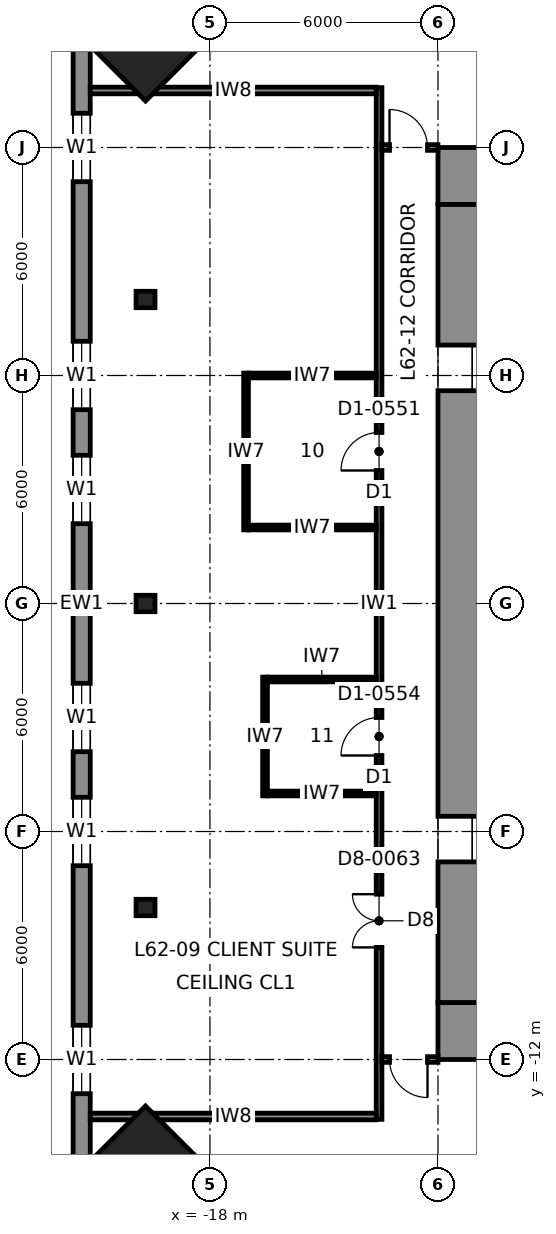
"""IFC4 building model, lengths in metres.
Left out: names, types, materials, properties, quantities, classifications, styles, units other than length and angle.
Written with IfcOpenShell. Run it as: python <this file> out.ifc"""

import sys

from ifc_helpers import new_model, si_unit, direction, frame, frame_2d, origin, origin_2d, place, context, subcontext, project, spatial, rectangle, i_section, extrude, element, fill, save


model = new_model("IFC4")
c1 = context("Model", 3, precision=1e-05, world=origin(), true_north=direction((0.0, 1.0)))
c2 = subcontext(c1, "Body", "Model", "MODEL_VIEW")
j1 = project(units=[si_unit("LENGTHUNIT", "METRE"), si_unit("PLANEANGLEUNIT", "RADIAN")], contexts=[c1])
p1 = place(None, origin())
s1 = spatial("IfcSite", under=j1, at=p1, CompositionType="ELEMENT")
p2 = place(p1, origin())
s2 = spatial("IfcBuilding", under=s1, at=p2, CompositionType="ELEMENT")
p3 = place(p2, frame((0.0, 0.0, 277.8)))
s3 = spatial("IfcBuildingStorey", under=s2, at=p3, CompositionType="ELEMENT", Elevation=277.8)
for number, where, z_axis, x_axis in (
    (1, (-19.695, -15.345, 0.0), (0.04, 0.04, 0.998), (-0.708, 0.707, 0.0)),
    (2, (-19.695, 15.345, 0.0), (0.04, -0.04, 0.998), (0.708, 0.707, 0.0)),
):
    element("IfcColumn", number, at=place(p3, frame(where, z_axis=z_axis, x_axis=x_axis)), inside=s3, PredefinedType="COLUMN", context=c2, shape_type="SweptSolid", body=[
        extrude(rectangle(XDim=3.0, YDim=3.0, at=origin_2d()), origin(), (0.0, 0.0, 1.0), 4.007),
    ])
for number, where, z_axis, x_axis in (
    (3, (-19.695, 0.0, 0.0), (0.04, 0.0, 0.999), (0.0, 1.0, 0.0)),
    (4, (-19.695, 8.0, 0.0), (0.04, 0.0, 0.999), (0.0, 1.0, 0.0)),
    (5, (-19.695, -8.0, 0.0), (0.04, 0.0, 0.999), (0.0, 1.0, 0.0)),
):
    element("IfcColumn", number, at=place(p3, frame(where, z_axis=z_axis, x_axis=x_axis)), inside=s3, PredefinedType="COLUMN", context=c2, shape_type="SweptSolid", body=[
        extrude(i_section(OverallWidth=0.432, OverallDepth=0.498, WebThickness=0.056, FlangeThickness=0.089, at=origin_2d()), origin(), (0.0, 0.0, 1.0), 4.003),
    ])
for number, where, z_axis, x_axis in (
    (6, (-12.0, 11.25, 0.0), (0.0, 0.0, 1.0), (1.0, 0.0, 0.0)),
    (7, (12.0, -11.25, 0.0), (0.0, 0.0, 1.0), (-1.0, 0.0, 0.0)),
):
    element("IfcWall", number, at=place(p3, frame(where, z_axis=z_axis, x_axis=x_axis)), inside=s3, PredefinedType="SHEAR", context=c2, shape_type="SweptSolid", body=[
        extrude(rectangle(XDim=24.0, YDim=1.5, at=frame_2d((12.0, 0.0))), origin(), (0.0, 0.0, 1.0), 4.0),
    ])
p4 = place(p3, frame((-11.25, -10.5, 0.0), z_axis=(0.0, 0.0, 1.0), x_axis=(0.0, 1.0, 0.0)))
e8 = element("IfcWall", 8, at=p4, inside=s3, PredefinedType="SHEAR", context=c2, shape_type="SweptSolid", body=[
    extrude(rectangle(XDim=21.0, YDim=1.5, at=frame_2d((10.5, 0.0))), origin(), (0.0, 0.0, 1.0), 4.0),
])
p5 = place(p4, frame((16.1, 0.0, 0.0)))
e9 = element("IfcOpeningElement", 9, at=p5, cuts=e8, PredefinedType="OPENING", context=c2, shape_type="SweptSolid", body=[
    extrude(rectangle(XDim=1.2, YDim=2.3, at=frame_2d((0.6, 1.15))), frame((0.0, 0.76, 0.0), z_axis=(0.0, -1.0, 0.0), x_axis=(1.0, 0.0, 0.0)), (0.0, 0.0, 1.0), 1.52),
])
p6 = place(p4, frame((3.7, 0.0, 0.0)))
e10 = element("IfcOpeningElement", 10, at=p6, cuts=e8, PredefinedType="OPENING", context=c2, shape_type="SweptSolid", body=[
    extrude(rectangle(XDim=1.2, YDim=2.3, at=frame_2d((0.6, 1.15))), frame((0.0, 0.76, 0.0), z_axis=(0.0, -1.0, 0.0), x_axis=(1.0, 0.0, 0.0)), (0.0, 0.0, 1.0), 1.52),
])
p7 = place(p3, frame((-21.375, 17.1, 0.0), z_axis=(0.0, 0.0, 1.0), x_axis=(0.0, -1.0, 0.0)))
e11 = element("IfcWall", 11, at=p7, inside=s3, PredefinedType="SOLIDWALL", context=c2, shape_type="SweptSolid", body=[
    extrude(rectangle(XDim=34.2, YDim=0.45, at=frame_2d((17.1, 0.0))), origin(), (0.0, 0.0, 1.0), 3.83),
])
p8 = place(p7, frame((4.2, 0.0, 0.7)))
e12 = element("IfcOpeningElement", 12, at=p8, cuts=e11, PredefinedType="OPENING", context=c2, shape_type="SweptSolid", body=[
    extrude(rectangle(XDim=1.8, YDim=2.6, at=frame_2d((0.9, 1.3))), frame((0.0, 0.235, 0.0), z_axis=(0.0, -1.0, 0.0), x_axis=(1.0, 0.0, 0.0)), (0.0, 0.0, 1.0), 0.47),
])
p9 = place(p7, frame((10.2, 0.0, 0.7)))
e13 = element("IfcOpeningElement", 13, at=p9, cuts=e11, PredefinedType="OPENING", context=c2, shape_type="SweptSolid", body=[
    extrude(rectangle(XDim=1.8, YDim=2.6, at=frame_2d((0.9, 1.3))), frame((0.0, 0.235, 0.0), z_axis=(0.0, -1.0, 0.0), x_axis=(1.0, 0.0, 0.0)), (0.0, 0.0, 1.0), 0.47),
])
p10 = place(p7, frame((13.2, 0.0, 0.7)))
e14 = element("IfcOpeningElement", 14, at=p10, cuts=e11, PredefinedType="OPENING", context=c2, shape_type="SweptSolid", body=[
    extrude(rectangle(XDim=1.8, YDim=2.6, at=frame_2d((0.9, 1.3))), frame((0.0, 0.235, 0.0), z_axis=(0.0, -1.0, 0.0), x_axis=(1.0, 0.0, 0.0)), (0.0, 0.0, 1.0), 0.47),
])
p11 = place(p7, frame((19.2, 0.0, 0.7)))
e15 = element("IfcOpeningElement", 15, at=p11, cuts=e11, PredefinedType="OPENING", context=c2, shape_type="SweptSolid", body=[
    extrude(rectangle(XDim=1.8, YDim=2.6, at=frame_2d((0.9, 1.3))), frame((0.0, 0.235, 0.0), z_axis=(0.0, -1.0, 0.0), x_axis=(1.0, 0.0, 0.0)), (0.0, 0.0, 1.0), 0.47),
])
p12 = place(p7, frame((22.2, 0.0, 0.7)))
e16 = element("IfcOpeningElement", 16, at=p12, cuts=e11, PredefinedType="OPENING", context=c2, shape_type="SweptSolid", body=[
    extrude(rectangle(XDim=1.8, YDim=2.6, at=frame_2d((0.9, 1.3))), frame((0.0, 0.235, 0.0), z_axis=(0.0, -1.0, 0.0), x_axis=(1.0, 0.0, 0.0)), (0.0, 0.0, 1.0), 0.47),
])
p13 = place(p7, frame((28.2, 0.0, 0.7)))
e17 = element("IfcOpeningElement", 17, at=p13, cuts=e11, PredefinedType="OPENING", context=c2, shape_type="SweptSolid", body=[
    extrude(rectangle(XDim=1.8, YDim=2.6, at=frame_2d((0.9, 1.3))), frame((0.0, 0.235, 0.0), z_axis=(0.0, -1.0, 0.0), x_axis=(1.0, 0.0, 0.0)), (0.0, 0.0, 1.0), 0.47),
])
p14 = place(p3, frame((-13.55, 13.575, 0.0), z_axis=(0.0, 0.0, 1.0), x_axis=(0.0, -1.0, 0.0)))
e18 = element("IfcWall", 18, at=p14, inside=s3, PredefinedType="PARTITIONING", context=c2, shape_type="SweptSolid", body=[
    extrude(rectangle(XDim=27.15, YDim=0.15, at=frame_2d((13.575, 0.0))), origin(), (0.0, 0.0, 1.0), 3.83),
])
p15 = place(p14, frame((21.225, 0.0, 0.0)))
e19 = element("IfcOpeningElement", 19, at=p15, cuts=e18, PredefinedType="OPENING", context=c2, shape_type="SweptSolid", body=[
    extrude(rectangle(XDim=1.4, YDim=2.3, at=frame_2d((0.7, 1.15))), frame((0.0, 0.085, 0.0), z_axis=(0.0, -1.0, 0.0), x_axis=(1.0, 0.0, 0.0)), (0.0, 0.0, 1.0), 0.17),
])
p16 = place(p14, frame((9.075, 0.0, 0.0)))
e20 = element("IfcOpeningElement", 20, at=p16, cuts=e18, PredefinedType="OPENING", context=c2, shape_type="SweptSolid", body=[
    extrude(rectangle(XDim=1.0, YDim=2.3, at=frame_2d((0.5, 1.15))), frame((0.0, 0.085, 0.0), z_axis=(0.0, -1.0, 0.0), x_axis=(1.0, 0.0, 0.0)), (0.0, 0.0, 1.0), 0.17),
])
p17 = place(p14, frame((16.575, 0.0, 0.0)))
e21 = element("IfcOpeningElement", 21, at=p17, cuts=e18, PredefinedType="OPENING", context=c2, shape_type="SweptSolid", body=[
    extrude(rectangle(XDim=1.0, YDim=2.3, at=frame_2d((0.5, 1.15))), frame((0.0, 0.085, 0.0), z_axis=(0.0, -1.0, 0.0), x_axis=(1.0, 0.0, 0.0)), (0.0, 0.0, 1.0), 0.17),
])
p18 = place(p3, frame((-13.475, 12.0, 0.0), z_axis=(0.0, 0.0, 1.0), x_axis=(1.0, 0.0, 0.0)))
e22 = element("IfcWall", 22, at=p18, inside=s3, PredefinedType="PARTITIONING", context=c2, shape_type="SweptSolid", body=[
    extrude(rectangle(XDim=1.475, YDim=0.15, at=frame_2d((0.738, 0.0))), origin(), (0.0, 0.0, 1.0), 3.83),
])
p19 = place(p18, frame((0.2, 0.0, 0.0)))
e23 = element("IfcOpeningElement", 23, at=p19, cuts=e22, PredefinedType="OPENING", context=c2, shape_type="SweptSolid", body=[
    extrude(rectangle(XDim=1.0, YDim=2.3, at=frame_2d((0.5, 1.15))), frame((0.0, 0.085, 0.0), z_axis=(0.0, -1.0, 0.0), x_axis=(1.0, 0.0, 0.0)), (0.0, 0.0, 1.0), 0.17),
])
p20 = place(p3, frame((-12.0, -12.0, 0.0), z_axis=(0.0, 0.0, 1.0), x_axis=(-1.0, 0.0, 0.0)))
e24 = element("IfcWall", 24, at=p20, inside=s3, PredefinedType="PARTITIONING", context=c2, shape_type="SweptSolid", body=[
    extrude(rectangle(XDim=1.475, YDim=0.15, at=frame_2d((0.738, 0.0))), origin(), (0.0, 0.0, 1.0), 3.83),
])
p21 = place(p20, frame((0.275, 0.0, 0.0)))
e25 = element("IfcOpeningElement", 25, at=p21, cuts=e24, PredefinedType="OPENING", context=c2, shape_type="SweptSolid", body=[
    extrude(rectangle(XDim=1.0, YDim=2.3, at=frame_2d((0.5, 1.15))), frame((0.0, 0.085, 0.0), z_axis=(0.0, -1.0, 0.0), x_axis=(1.0, 0.0, 0.0)), (0.0, 0.0, 1.0), 0.17),
])
for number, where, z_axis, x_axis in (
    (26, (-21.15, 13.5, 0.0), (0.0, 0.0, 1.0), (1.0, 0.0, 0.0)),
    (27, (-13.625, -13.5, 0.0), (0.0, 0.0, 1.0), (-1.0, 0.0, 0.0)),
):
    element("IfcWall", number, at=place(p3, frame(where, z_axis=z_axis, x_axis=x_axis)), inside=s3, PredefinedType="PARTITIONING", context=c2, shape_type="SweptSolid", body=[
        extrude(rectangle(XDim=7.525, YDim=0.175, at=frame_2d((3.762, 0.0))), origin(), (0.0, 0.0, 1.0), 3.83),
    ])
p22 = place(p3, frame((-17.05, 1.938, 0.0), z_axis=(0.0, 0.0, 1.0), x_axis=(0.0, 1.0, 0.0)))
e28 = element("IfcWall", 28, at=p22, inside=s3, PredefinedType="PARTITIONING", context=c2, shape_type="SweptSolid", body=[
    extrude(rectangle(XDim=4.125, YDim=0.125, at=frame_2d((2.062, 0.0))), origin(), (0.0, 0.0, 1.0), 3.83),
])
for number, where, z_axis, x_axis in (
    (29, (-13.625, 2.0, 0.0), (0.0, 0.0, 1.0), (-1.0, 0.0, 0.0)),
    (30, (-13.625, 6.0, 0.0), (0.0, 0.0, 1.0), (-1.0, 0.0, 0.0)),
):
    element("IfcWall", number, at=place(p3, frame(where, z_axis=z_axis, x_axis=x_axis)), inside=s3, PredefinedType="PARTITIONING", context=c2, shape_type="SweptSolid", body=[
        extrude(rectangle(XDim=3.363, YDim=0.125, at=frame_2d((1.681, 0.0))), origin(), (0.0, 0.0, 1.0), 3.83),
    ])
p23 = place(p3, frame((-16.55, -5.062, 0.0), z_axis=(0.0, 0.0, 1.0), x_axis=(0.0, 1.0, 0.0)))
e31 = element("IfcWall", 31, at=p23, inside=s3, PredefinedType="PARTITIONING", context=c2, shape_type="SweptSolid", body=[
    extrude(rectangle(XDim=3.125, YDim=0.125, at=frame_2d((1.562, 0.0))), origin(), (0.0, 0.0, 1.0), 3.83),
])
for number, where, z_axis, x_axis in (
    (32, (-13.625, -5.0, 0.0), (0.0, 0.0, 1.0), (-1.0, 0.0, 0.0)),
    (33, (-13.625, -2.0, 0.0), (0.0, 0.0, 1.0), (-1.0, 0.0, 0.0)),
):
    element("IfcWall", number, at=place(p3, frame(where, z_axis=z_axis, x_axis=x_axis)), inside=s3, PredefinedType="PARTITIONING", context=c2, shape_type="SweptSolid", body=[
        extrude(rectangle(XDim=2.863, YDim=0.125, at=frame_2d((1.431, 0.0))), origin(), (0.0, 0.0, 1.0), 3.83),
    ])
p24 = place(p8, origin())
e34 = element("IfcWindow", 34, at=p24, inside=s3, PartitioningType="SINGLE_PANEL", PredefinedType="WINDOW", context=c2, shape_type="SweptSolid", body=[
    extrude(rectangle(XDim=1.8, YDim=2.6, at=frame_2d((0.9, 1.3))), frame((0.0, 0.03, 0.0), z_axis=(0.0, -1.0, 0.0), x_axis=(1.0, 0.0, 0.0)), (0.0, 0.0, 1.0), 0.06),
])
fill(e12, e34)
p25 = place(p9, origin())
e35 = element("IfcWindow", 35, at=p25, inside=s3, PartitioningType="SINGLE_PANEL", PredefinedType="WINDOW", context=c2, shape_type="SweptSolid", body=[
    extrude(rectangle(XDim=1.8, YDim=2.6, at=frame_2d((0.9, 1.3))), frame((0.0, 0.03, 0.0), z_axis=(0.0, -1.0, 0.0), x_axis=(1.0, 0.0, 0.0)), (0.0, 0.0, 1.0), 0.06),
])
fill(e13, e35)
p26 = place(p10, origin())
e36 = element("IfcWindow", 36, at=p26, inside=s3, PartitioningType="SINGLE_PANEL", PredefinedType="WINDOW", context=c2, shape_type="SweptSolid", body=[
    extrude(rectangle(XDim=1.8, YDim=2.6, at=frame_2d((0.9, 1.3))), frame((0.0, 0.03, 0.0), z_axis=(0.0, -1.0, 0.0), x_axis=(1.0, 0.0, 0.0)), (0.0, 0.0, 1.0), 0.06),
])
fill(e14, e36)
p27 = place(p11, origin())
e37 = element("IfcWindow", 37, at=p27, inside=s3, PartitioningType="SINGLE_PANEL", PredefinedType="WINDOW", context=c2, shape_type="SweptSolid", body=[
    extrude(rectangle(XDim=1.8, YDim=2.6, at=frame_2d((0.9, 1.3))), frame((0.0, 0.03, 0.0), z_axis=(0.0, -1.0, 0.0), x_axis=(1.0, 0.0, 0.0)), (0.0, 0.0, 1.0), 0.06),
])
fill(e15, e37)
p28 = place(p12, origin())
e38 = element("IfcWindow", 38, at=p28, inside=s3, PartitioningType="SINGLE_PANEL", PredefinedType="WINDOW", context=c2, shape_type="SweptSolid", body=[
    extrude(rectangle(XDim=1.8, YDim=2.6, at=frame_2d((0.9, 1.3))), frame((0.0, 0.03, 0.0), z_axis=(0.0, -1.0, 0.0), x_axis=(1.0, 0.0, 0.0)), (0.0, 0.0, 1.0), 0.06),
])
fill(e16, e38)
p29 = place(p13, origin())
e39 = element("IfcWindow", 39, at=p29, inside=s3, PartitioningType="SINGLE_PANEL", PredefinedType="WINDOW", context=c2, shape_type="SweptSolid", body=[
    extrude(rectangle(XDim=1.8, YDim=2.6, at=frame_2d((0.9, 1.3))), frame((0.0, 0.03, 0.0), z_axis=(0.0, -1.0, 0.0), x_axis=(1.0, 0.0, 0.0)), (0.0, 0.0, 1.0), 0.06),
])
fill(e17, e39)
p30 = place(p19, origin())
e40 = element("IfcDoor", 40, at=p30, inside=s3, OperationType="SINGLE_SWING_LEFT", PredefinedType="DOOR", context=c2, shape_type="SweptSolid", body=[
    extrude(rectangle(XDim=1.0, YDim=2.3, at=frame_2d((0.5, 1.15))), frame((0.0, 0.025, 0.0), z_axis=(0.0, -1.0, 0.0), x_axis=(1.0, 0.0, 0.0)), (0.0, 0.0, 1.0), 0.05),
])
fill(e23, e40)
p31 = place(p21, origin())
e41 = element("IfcDoor", 41, at=p31, inside=s3, OperationType="SINGLE_SWING_LEFT", PredefinedType="DOOR", context=c2, shape_type="SweptSolid", body=[
    extrude(rectangle(XDim=1.0, YDim=2.3, at=frame_2d((0.5, 1.15))), frame((0.0, 0.025, 0.0), z_axis=(0.0, -1.0, 0.0), x_axis=(1.0, 0.0, 0.0)), (0.0, 0.0, 1.0), 0.05),
])
fill(e25, e41)
p32 = place(p15, frame((1.4, 0.0, 0.0), z_axis=(0.0, 0.0, 1.0), x_axis=(-1.0, 0.0, 0.0)))
e42 = element("IfcDoor", 42, at=p32, inside=s3, OperationType="DOUBLE_DOOR_SINGLE_SWING", PredefinedType="DOOR", context=c2, shape_type="SweptSolid", body=[
    extrude(rectangle(XDim=1.4, YDim=2.3, at=frame_2d((0.7, 1.15))), frame((0.0, 0.025, 0.0), z_axis=(0.0, -1.0, 0.0), x_axis=(1.0, 0.0, 0.0)), (0.0, 0.0, 1.0), 0.05),
])
fill(e19, e42)
p33 = place(p16, frame((1.0, 0.0, 0.0), z_axis=(0.0, 0.0, 1.0), x_axis=(-1.0, 0.0, 0.0)))
e43 = element("IfcDoor", 43, at=p33, inside=s3, OperationType="SINGLE_SWING_LEFT", PredefinedType="DOOR", context=c2, shape_type="SweptSolid", body=[
    extrude(rectangle(XDim=1.0, YDim=2.3, at=frame_2d((0.5, 1.15))), frame((0.0, 0.025, 0.0), z_axis=(0.0, -1.0, 0.0), x_axis=(1.0, 0.0, 0.0)), (0.0, 0.0, 1.0), 0.05),
])
fill(e20, e43)
p34 = place(p17, frame((1.0, 0.0, 0.0), z_axis=(0.0, 0.0, 1.0), x_axis=(-1.0, 0.0, 0.0)))
e44 = element("IfcDoor", 44, at=p34, inside=s3, OperationType="SINGLE_SWING_LEFT", PredefinedType="DOOR", context=c2, shape_type="SweptSolid", body=[
    extrude(rectangle(XDim=1.0, YDim=2.3, at=frame_2d((0.5, 1.15))), frame((0.0, 0.025, 0.0), z_axis=(0.0, -1.0, 0.0), x_axis=(1.0, 0.0, 0.0)), (0.0, 0.0, 1.0), 0.05),
])
fill(e21, e44)
p35 = place(p5, frame((1.2, 0.0, 0.0), z_axis=(0.0, 0.0, 1.0), x_axis=(-1.0, 0.0, 0.0)))
e45 = element("IfcDoor", 45, at=p35, inside=s3, OperationType="SINGLE_SWING_LEFT", PredefinedType="DOOR", context=c2, shape_type="SweptSolid", body=[
    extrude(rectangle(XDim=1.2, YDim=2.3, at=frame_2d((0.6, 1.15))), frame((0.0, 0.025, 0.0), z_axis=(0.0, -1.0, 0.0), x_axis=(1.0, 0.0, 0.0)), (0.0, 0.0, 1.0), 0.05),
])
fill(e9, e45)
p36 = place(p6, frame((1.2, 0.0, 0.0), z_axis=(0.0, 0.0, 1.0), x_axis=(-1.0, 0.0, 0.0)))
e46 = element("IfcDoor", 46, at=p36, inside=s3, OperationType="SINGLE_SWING_LEFT", PredefinedType="DOOR", context=c2, shape_type="SweptSolid", body=[
    extrude(rectangle(XDim=1.2, YDim=2.3, at=frame_2d((0.6, 1.15))), frame((0.0, 0.025, 0.0), z_axis=(0.0, -1.0, 0.0), x_axis=(1.0, 0.0, 0.0)), (0.0, 0.0, 1.0), 0.05),
])
fill(e10, e46)
save(model, sys.argv[1])
